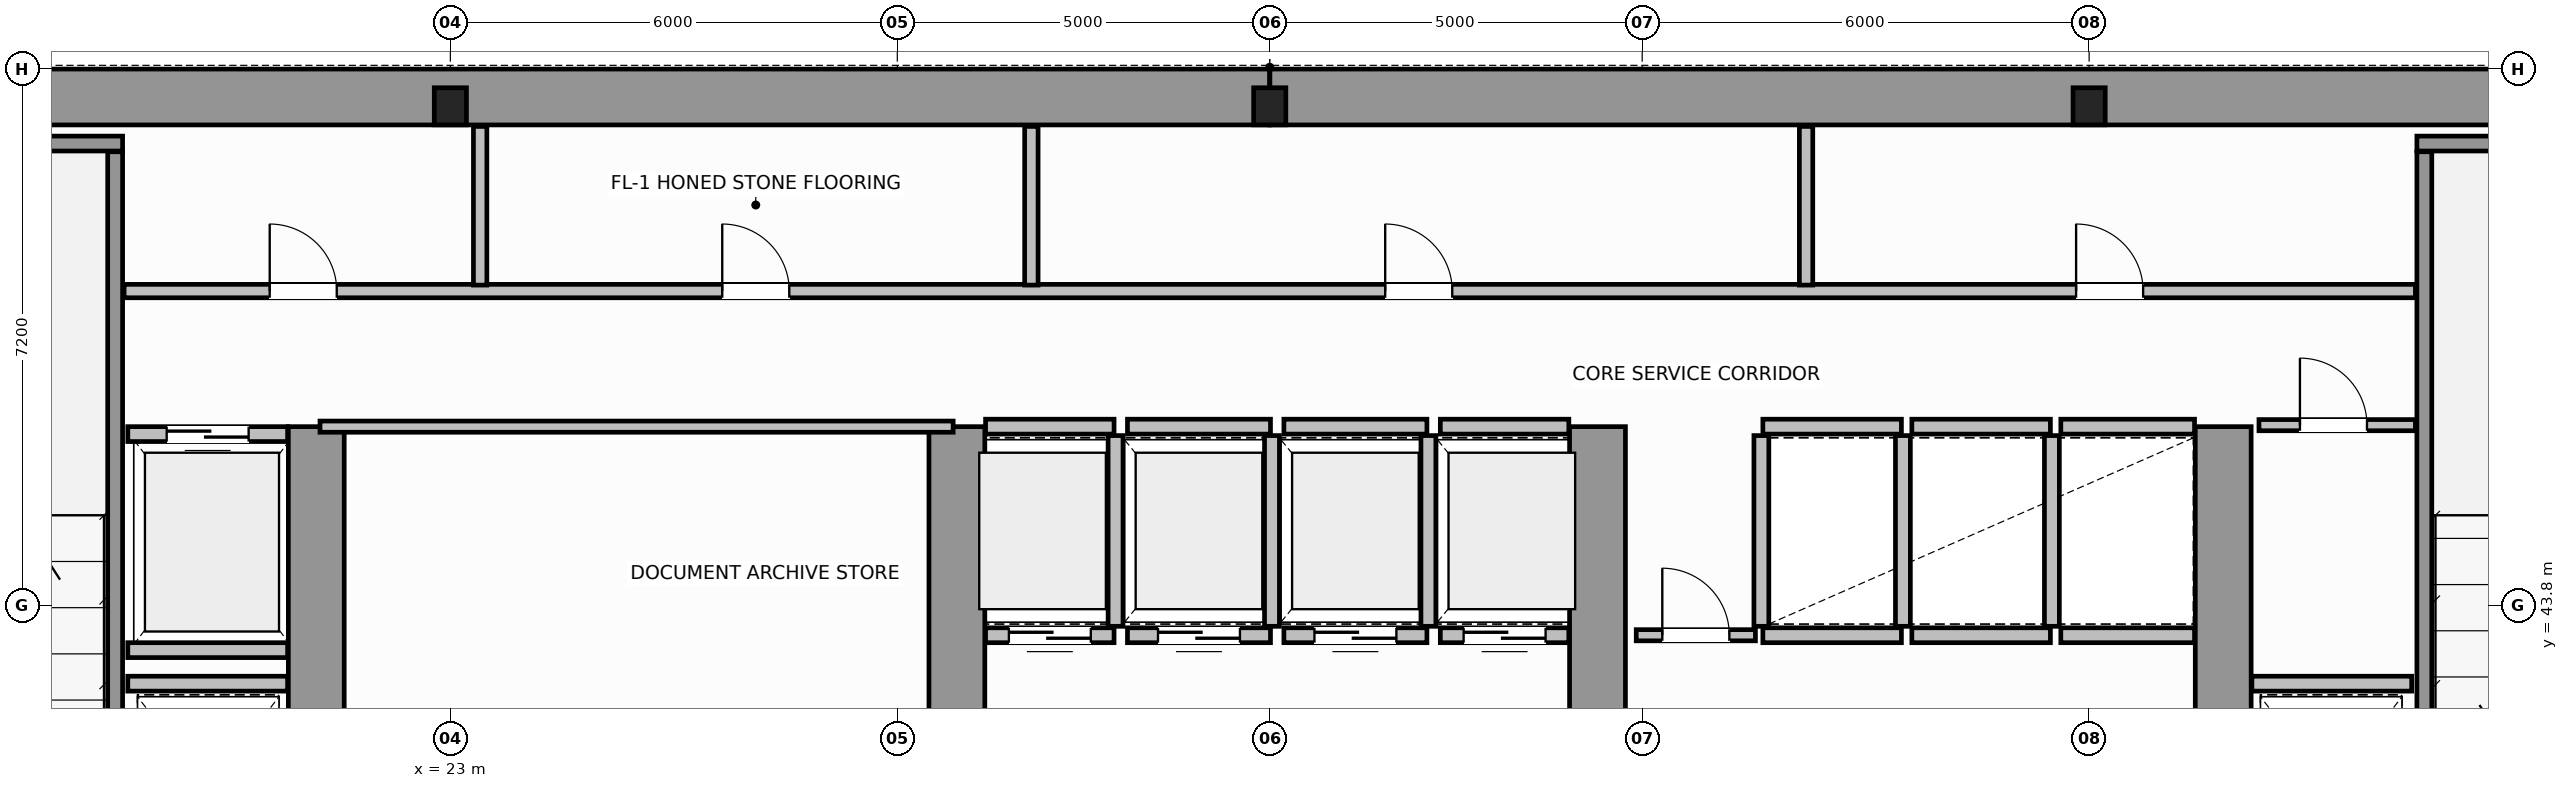
"""IFC4 building model, lengths in metres.
Left out: names, types, materials, properties, quantities, classifications, styles, units other than length and angle.
Written with IfcOpenShell. Run it as: python <this file> out.ifc"""

import sys

from ifc_helpers import new_model, si_unit, direction, frame, frame_2d, origin, origin_2d, place, context, subcontext, project, spatial, rectangle, i_section, extrude, source, transform, mapped, element, fill, save


model = new_model("IFC4")
c1 = context("Model", 3, precision=1e-05, world=origin(), true_north=direction((0.0, 1.0)))
c2 = subcontext(c1, "Body", "Model", "MODEL_VIEW")
j1 = project(units=[si_unit("LENGTHUNIT", "METRE"), si_unit("PLANEANGLEUNIT", "RADIAN")], contexts=[c1])
p1 = place(None, origin())
s1 = spatial("IfcSite", under=j1, at=p1, CompositionType="ELEMENT")
p2 = place(p1, origin())
s2 = spatial("IfcBuilding", under=s1, at=p2, CompositionType="ELEMENT")
p3 = place(p2, frame((0.0, 0.0, 145.2)))
s3 = spatial("IfcBuildingStorey", under=s2, at=p3, CompositionType="ELEMENT", Elevation=145.2)
m1 = source(origin(), c2, "Body", "SweptSolid", [
    extrude(i_section(OverallWidth=0.432, OverallDepth=0.498, WebThickness=0.055, FlangeThickness=0.068, FilletRadius=0.015, at=origin_2d()), origin(), (0.0, 0.0, 1.0), 3.8),
])
for number, where, z_axis, x_axis in (
    (1, (23.0, 50.5, 0.0), (0.0, 0.0, 1.0), (1.0, 0.0, 0.0)),
    (2, (34.0, 50.5, 0.0), (0.0, 0.0, 1.0), (1.0, 0.0, 0.0)),
    (3, (45.0, 50.5, 0.0), (0.0, 0.0, 1.0), (1.0, 0.0, 0.0)),
):
    element("IfcColumn", number, at=place(p3, frame(where, z_axis=z_axis, x_axis=x_axis)), inside=s3, PredefinedType="COLUMN", context=c2, shape_type="MappedRepresentation", body=[
        mapped(m1, transform((0.0, 0.0, 0.0), scale=1.0)),
    ])
for number, where, z_axis, x_axis in (
    (4, (14.379, 50.625, 0.0), (0.0, 0.0, 1.0), (1.0, 0.0, 0.0)),
    (5, (34.002, 50.625, 0.0), (0.0, 0.0, 1.0), (1.0, 0.0, 0.0)),
):
    element("IfcWall", number, at=place(p3, frame(where, z_axis=z_axis, x_axis=x_axis)), inside=s3, PredefinedType="SHEAR", context=c2, shape_type="SweptSolid", body=[
        extrude(rectangle(XDim=19.619, YDim=0.75, at=frame_2d((9.81, 0.0))), origin(), (0.0, 0.0, 1.0), 3.8),
    ])
for number, where, z_axis, x_axis in (
    (6, (21.2, 36.895, 0.0), (0.0, 0.0, 1.0), (0.0, 1.0, 0.0)),
    (7, (29.8, 36.895, 0.0), (0.0, 0.0, 1.0), (0.0, 1.0, 0.0)),
    (8, (38.4, 36.895, 0.0), (0.0, 0.0, 1.0), (0.0, 1.0, 0.0)),
    (9, (46.8, 36.895, 0.0), (0.0, 0.0, 1.0), (0.0, 1.0, 0.0)),
):
    element("IfcWall", number, at=place(p3, frame(where, z_axis=z_axis, x_axis=x_axis)), inside=s3, PredefinedType="SHEAR", context=c2, shape_type="SweptSolid", body=[
        extrude(rectangle(XDim=9.305, YDim=0.75, at=frame_2d((4.652, 0.0))), origin(), (0.0, 0.0, 1.0), 3.8),
    ])
p4 = place(p3, frame((14.375, 50.0, 0.0), z_axis=(0.0, 0.0, 1.0), x_axis=(1.0, 0.0, 0.0)))
e10 = element("IfcWall", 10, at=p4, inside=s3, PredefinedType="SOLIDWALL", context=c2, shape_type="SweptSolid", body=[
    extrude(rectangle(XDim=4.225, YDim=0.2, at=frame_2d((2.113, 0.0))), origin(), (0.0, 0.0, 1.0), 3.8),
])
p5 = place(p3, frame((18.5, 39.96, 0.0), z_axis=(0.0, 0.0, 1.0), x_axis=(0.0, 1.0, 0.0)))
e11 = element("IfcWall", 11, at=p5, inside=s3, PredefinedType="SOLIDWALL", context=c2, shape_type="SweptSolid", body=[
    extrude(rectangle(XDim=9.93, YDim=0.2, at=frame_2d((4.965, 0.0))), origin(), (0.0, 0.0, 1.0), 3.8),
])
p6 = place(p3, frame((49.4, 50.0, 0.0), z_axis=(0.0, 0.0, 1.0), x_axis=(1.0, 0.0, 0.0)))
e12 = element("IfcWall", 12, at=p6, inside=s3, PredefinedType="SOLIDWALL", context=c2, shape_type="SweptSolid", body=[
    extrude(rectangle(XDim=4.225, YDim=0.2, at=frame_2d((2.113, 0.0))), origin(), (0.0, 0.0, 1.0), 3.8),
])
p7 = place(p3, frame((49.5, 39.96, 0.0), z_axis=(0.0, 0.0, 1.0), x_axis=(0.0, 1.0, 0.0)))
e13 = element("IfcWall", 13, at=p7, inside=s3, PredefinedType="SOLIDWALL", context=c2, shape_type="SweptSolid", body=[
    extrude(rectangle(XDim=9.93, YDim=0.2, at=frame_2d((4.965, 0.0))), origin(), (0.0, 0.0, 1.0), 3.8),
])
p8 = place(p3, frame((30.185, 43.4, 0.0), z_axis=(0.0, 0.0, 1.0), x_axis=(1.0, 0.0, 0.0)))
e14 = element("IfcWall", 14, at=p8, inside=s3, PredefinedType="SOLIDWALL", context=c2, shape_type="SweptSolid", body=[
    extrude(rectangle(XDim=1.725, YDim=0.2, at=frame_2d((0.862, 0.0))), origin(), (0.0, 0.0, 1.0), 3.54),
])
p9 = place(p8, frame((0.313, 0.0, 0.0)))
e15 = element("IfcOpeningElement", 15, at=p9, cuts=e14, PredefinedType="OPENING", context=c2, shape_type="SweptSolid", body=[
    extrude(rectangle(XDim=1.1, YDim=2.15, at=frame_2d((0.55, 1.075))), frame((0.0, 0.11, 0.0), z_axis=(0.0, -1.0, 0.0), x_axis=(1.0, 0.0, 0.0)), (0.0, 0.0, 1.0), 0.22),
])
p10 = place(p3, frame((30.185, 46.2, 0.0), z_axis=(0.0, 0.0, 1.0), x_axis=(1.0, 0.0, 0.0)))
e16 = element("IfcWall", 16, at=p10, inside=s3, PredefinedType="SOLIDWALL", context=c2, shape_type="SweptSolid", body=[
    extrude(rectangle(XDim=1.725, YDim=0.2, at=frame_2d((0.862, 0.0))), origin(), (0.0, 0.0, 1.0), 3.54),
])
p11 = place(p3, frame((31.93, 43.52, 0.0), z_axis=(0.0, 0.0, 1.0), x_axis=(0.0, 1.0, 0.0)))
e17 = element("IfcWall", 17, at=p11, inside=s3, PredefinedType="SOLIDWALL", context=c2, shape_type="SweptSolid", body=[
    extrude(rectangle(XDim=2.56, YDim=0.2, at=frame_2d((1.28, 0.0))), origin(), (0.0, 0.0, 1.0), 3.54),
])
p12 = place(p3, frame((32.09, 43.4, 0.0), z_axis=(0.0, 0.0, 1.0), x_axis=(1.0, 0.0, 0.0)))
e18 = element("IfcWall", 18, at=p12, inside=s3, PredefinedType="SOLIDWALL", context=c2, shape_type="SweptSolid", body=[
    extrude(rectangle(XDim=1.92, YDim=0.2, at=frame_2d((0.96, 0.0))), origin(), (0.0, 0.0, 1.0), 3.54),
])
p13 = place(p12, frame((0.41, 0.0, 0.0)))
e19 = element("IfcOpeningElement", 19, at=p13, cuts=e18, PredefinedType="OPENING", context=c2, shape_type="SweptSolid", body=[
    extrude(rectangle(XDim=1.1, YDim=2.15, at=frame_2d((0.55, 1.075))), frame((0.0, 0.11, 0.0), z_axis=(0.0, -1.0, 0.0), x_axis=(1.0, 0.0, 0.0)), (0.0, 0.0, 1.0), 0.22),
])
p14 = place(p3, frame((32.09, 46.2, 0.0), z_axis=(0.0, 0.0, 1.0), x_axis=(1.0, 0.0, 0.0)))
e20 = element("IfcWall", 20, at=p14, inside=s3, PredefinedType="SOLIDWALL", context=c2, shape_type="SweptSolid", body=[
    extrude(rectangle(XDim=1.92, YDim=0.2, at=frame_2d((0.96, 0.0))), origin(), (0.0, 0.0, 1.0), 3.54),
])
p15 = place(p3, frame((34.03, 43.52, 0.0), z_axis=(0.0, 0.0, 1.0), x_axis=(0.0, 1.0, 0.0)))
e21 = element("IfcWall", 21, at=p15, inside=s3, PredefinedType="SOLIDWALL", context=c2, shape_type="SweptSolid", body=[
    extrude(rectangle(XDim=2.56, YDim=0.2, at=frame_2d((1.28, 0.0))), origin(), (0.0, 0.0, 1.0), 3.54),
])
p16 = place(p3, frame((34.19, 43.4, 0.0), z_axis=(0.0, 0.0, 1.0), x_axis=(1.0, 0.0, 0.0)))
e22 = element("IfcWall", 22, at=p16, inside=s3, PredefinedType="SOLIDWALL", context=c2, shape_type="SweptSolid", body=[
    extrude(rectangle(XDim=1.92, YDim=0.2, at=frame_2d((0.96, 0.0))), origin(), (0.0, 0.0, 1.0), 3.54),
])
p17 = place(p16, frame((0.41, 0.0, 0.0)))
e23 = element("IfcOpeningElement", 23, at=p17, cuts=e22, PredefinedType="OPENING", context=c2, shape_type="SweptSolid", body=[
    extrude(rectangle(XDim=1.1, YDim=2.15, at=frame_2d((0.55, 1.075))), frame((0.0, 0.11, 0.0), z_axis=(0.0, -1.0, 0.0), x_axis=(1.0, 0.0, 0.0)), (0.0, 0.0, 1.0), 0.22),
])
p18 = place(p3, frame((34.19, 46.2, 0.0), z_axis=(0.0, 0.0, 1.0), x_axis=(1.0, 0.0, 0.0)))
e24 = element("IfcWall", 24, at=p18, inside=s3, PredefinedType="SOLIDWALL", context=c2, shape_type="SweptSolid", body=[
    extrude(rectangle(XDim=1.92, YDim=0.2, at=frame_2d((0.96, 0.0))), origin(), (0.0, 0.0, 1.0), 3.54),
])
p19 = place(p3, frame((36.13, 43.52, 0.0), z_axis=(0.0, 0.0, 1.0), x_axis=(0.0, 1.0, 0.0)))
e25 = element("IfcWall", 25, at=p19, inside=s3, PredefinedType="SOLIDWALL", context=c2, shape_type="SweptSolid", body=[
    extrude(rectangle(XDim=2.56, YDim=0.2, at=frame_2d((1.28, 0.0))), origin(), (0.0, 0.0, 1.0), 3.54),
])
p20 = place(p3, frame((36.29, 43.4, 0.0), z_axis=(0.0, 0.0, 1.0), x_axis=(1.0, 0.0, 0.0)))
e26 = element("IfcWall", 26, at=p20, inside=s3, PredefinedType="SOLIDWALL", context=c2, shape_type="SweptSolid", body=[
    extrude(rectangle(XDim=1.725, YDim=0.2, at=frame_2d((0.862, 0.0))), origin(), (0.0, 0.0, 1.0), 3.54),
])
p21 = place(p20, frame((0.313, 0.0, 0.0)))
e27 = element("IfcOpeningElement", 27, at=p21, cuts=e26, PredefinedType="OPENING", context=c2, shape_type="SweptSolid", body=[
    extrude(rectangle(XDim=1.1, YDim=2.15, at=frame_2d((0.55, 1.075))), frame((0.0, 0.11, 0.0), z_axis=(0.0, -1.0, 0.0), x_axis=(1.0, 0.0, 0.0)), (0.0, 0.0, 1.0), 0.22),
])
p22 = place(p3, frame((36.29, 46.2, 0.0), z_axis=(0.0, 0.0, 1.0), x_axis=(1.0, 0.0, 0.0)))
e28 = element("IfcWall", 28, at=p22, inside=s3, PredefinedType="SOLIDWALL", context=c2, shape_type="SweptSolid", body=[
    extrude(rectangle(XDim=1.725, YDim=0.2, at=frame_2d((0.862, 0.0))), origin(), (0.0, 0.0, 1.0), 3.54),
])
for number, where, z_axis, x_axis in (
    (29, (40.62, 43.4, 0.0), (0.0, 0.0, 1.0), (1.0, 0.0, 0.0)),
    (30, (40.62, 46.2, 0.0), (0.0, 0.0, 1.0), (1.0, 0.0, 0.0)),
):
    element("IfcWall", number, at=place(p3, frame(where, z_axis=z_axis, x_axis=x_axis)), inside=s3, PredefinedType="SOLIDWALL", context=c2, shape_type="SweptSolid", body=[
        extrude(rectangle(XDim=1.86, YDim=0.2, at=frame_2d((0.93, 0.0))), origin(), (0.0, 0.0, 1.0), 3.54),
    ])
for number, where, z_axis, x_axis in (
    (31, (40.6, 43.52, 0.0), (0.0, 0.0, 1.0), (0.0, 1.0, 0.0)),
    (32, (42.5, 43.52, 0.0), (0.0, 0.0, 1.0), (0.0, 1.0, 0.0)),
):
    element("IfcWall", number, at=place(p3, frame(where, z_axis=z_axis, x_axis=x_axis)), inside=s3, PredefinedType="SOLIDWALL", context=c2, shape_type="SweptSolid", body=[
        extrude(rectangle(XDim=2.56, YDim=0.2, at=frame_2d((1.28, 0.0))), origin(), (0.0, 0.0, 1.0), 3.54),
    ])
for number, where, z_axis, x_axis in (
    (33, (42.62, 43.4, 0.0), (0.0, 0.0, 1.0), (1.0, 0.0, 0.0)),
    (34, (42.62, 46.2, 0.0), (0.0, 0.0, 1.0), (1.0, 0.0, 0.0)),
):
    element("IfcWall", number, at=place(p3, frame(where, z_axis=z_axis, x_axis=x_axis)), inside=s3, PredefinedType="SOLIDWALL", context=c2, shape_type="SweptSolid", body=[
        extrude(rectangle(XDim=1.86, YDim=0.2, at=frame_2d((0.93, 0.0))), origin(), (0.0, 0.0, 1.0), 3.54),
    ])
p23 = place(p3, frame((44.5, 43.52, 0.0), z_axis=(0.0, 0.0, 1.0), x_axis=(0.0, 1.0, 0.0)))
e35 = element("IfcWall", 35, at=p23, inside=s3, PredefinedType="SOLIDWALL", context=c2, shape_type="SweptSolid", body=[
    extrude(rectangle(XDim=2.56, YDim=0.2, at=frame_2d((1.28, 0.0))), origin(), (0.0, 0.0, 1.0), 3.54),
])
for number, where, z_axis, x_axis in (
    (36, (44.62, 43.4, 0.0), (0.0, 0.0, 1.0), (1.0, 0.0, 0.0)),
    (37, (44.62, 46.2, 0.0), (0.0, 0.0, 1.0), (1.0, 0.0, 0.0)),
):
    element("IfcWall", number, at=place(p3, frame(where, z_axis=z_axis, x_axis=x_axis)), inside=s3, PredefinedType="SOLIDWALL", context=c2, shape_type="SweptSolid", body=[
        extrude(rectangle(XDim=1.795, YDim=0.2, at=frame_2d((0.897, 0.0))), origin(), (0.0, 0.0, 1.0), 3.54),
    ])
p24 = place(p3, frame((18.67, 46.1, 0.0), z_axis=(0.0, 0.0, 1.0), x_axis=(1.0, 0.0, 0.0)))
e38 = element("IfcWall", 38, at=p24, inside=s3, PredefinedType="SOLIDWALL", context=c2, shape_type="SweptSolid", body=[
    extrude(rectangle(XDim=2.145, YDim=0.2, at=frame_2d((1.073, 0.0))), origin(), (0.0, 0.0, 1.0), 3.54),
])
p25 = place(p24, frame((0.522, 0.0, 0.0)))
e39 = element("IfcOpeningElement", 39, at=p25, cuts=e38, PredefinedType="OPENING", context=c2, shape_type="SweptSolid", body=[
    extrude(rectangle(XDim=1.1, YDim=2.15, at=frame_2d((0.55, 1.075))), frame((0.0, 0.11, 0.0), z_axis=(0.0, -1.0, 0.0), x_axis=(1.0, 0.0, 0.0)), (0.0, 0.0, 1.0), 0.22),
])
for number, where, z_axis, x_axis in (
    (40, (18.67, 43.2, 0.0), (0.0, 0.0, 1.0), (1.0, 0.0, 0.0)),
    (41, (18.67, 42.75, 0.0), (0.0, 0.0, 1.0), (1.0, 0.0, 0.0)),
    (42, (47.185, 42.75, 0.0), (0.0, 0.0, 1.0), (1.0, 0.0, 0.0)),
):
    element("IfcWall", number, at=place(p3, frame(where, z_axis=z_axis, x_axis=x_axis)), inside=s3, PredefinedType="SOLIDWALL", context=c2, shape_type="SweptSolid", body=[
        extrude(rectangle(XDim=2.145, YDim=0.2, at=frame_2d((1.073, 0.0))), origin(), (0.0, 0.0, 1.0), 3.54),
    ])
p26 = place(p3, frame((21.25, 46.2, 0.0), z_axis=(0.0, 0.0, 1.0), x_axis=(1.0, 0.0, 0.0)))
e43 = element("IfcWall", 43, at=p26, inside=s3, PredefinedType="PARTITIONING", context=c2, shape_type="SweptSolid", body=[
    extrude(rectangle(XDim=8.5, YDim=0.15, at=frame_2d((4.25, 0.0))), origin(), (0.0, 0.0, 1.0), 3.54),
])
p27 = place(p3, frame((47.28, 46.22, 0.0), z_axis=(0.0, 0.0, 1.0), x_axis=(1.0, 0.0, 0.0)))
e44 = element("IfcWall", 44, at=p27, inside=s3, PredefinedType="PARTITIONING", context=c2, shape_type="SweptSolid", body=[
    extrude(rectangle(XDim=2.1, YDim=0.15, at=frame_2d((1.05, 0.0))), origin(), (0.0, 0.0, 1.0), 3.54),
])
p28 = place(p27, frame((0.55, 0.0, 0.0)))
e45 = element("IfcOpeningElement", 45, at=p28, cuts=e44, PredefinedType="OPENING", context=c2, shape_type="SweptSolid", body=[
    extrude(rectangle(XDim=0.9, YDim=2.1, at=frame_2d((0.45, 1.05))), frame((0.0, 0.085, 0.0), z_axis=(0.0, -1.0, 0.0), x_axis=(1.0, 0.0, 0.0)), (0.0, 0.0, 1.0), 0.17),
])
p29 = place(p3, frame((38.92, 43.4, 0.0), z_axis=(0.0, 0.0, 1.0), x_axis=(1.0, 0.0, 0.0)))
e46 = element("IfcWall", 46, at=p29, inside=s3, PredefinedType="PARTITIONING", context=c2, shape_type="SweptSolid", body=[
    extrude(rectangle(XDim=1.6, YDim=0.15, at=frame_2d((0.8, 0.0))), origin(), (0.0, 0.0, 1.0), 3.54),
])
p30 = place(p29, frame((0.35, 0.0, 0.0)))
e47 = element("IfcOpeningElement", 47, at=p30, cuts=e46, PredefinedType="OPENING", context=c2, shape_type="SweptSolid", body=[
    extrude(rectangle(XDim=0.9, YDim=2.1, at=frame_2d((0.45, 1.05))), frame((0.0, 0.085, 0.0), z_axis=(0.0, -1.0, 0.0), x_axis=(1.0, 0.0, 0.0)), (0.0, 0.0, 1.0), 0.17),
])
p31 = place(p3, frame((18.62, 48.02, 0.0), z_axis=(0.0, 0.0, 1.0), x_axis=(1.0, 0.0, 0.0)))
e48 = element("IfcWall", 48, at=p31, inside=s3, PredefinedType="PLUMBINGWALL", context=c2, shape_type="SweptSolid", body=[
    extrude(rectangle(XDim=30.76, YDim=0.18, at=frame_2d((15.38, 0.0))), origin(), (0.0, 0.0, 1.0), 3.54),
])
p32 = place(p31, frame((1.955, 0.0, 0.0)))
e49 = element("IfcOpeningElement", 49, at=p32, cuts=e48, PredefinedType="OPENING", context=c2, shape_type="SweptSolid", body=[
    extrude(rectangle(XDim=0.9, YDim=2.15, at=frame_2d((0.45, 1.075))), frame((0.0, 0.1, 0.0), z_axis=(0.0, -1.0, 0.0), x_axis=(1.0, 0.0, 0.0)), (0.0, 0.0, 1.0), 0.2),
])
p33 = place(p31, frame((8.03, 0.0, 0.0)))
e50 = element("IfcOpeningElement", 50, at=p33, cuts=e48, PredefinedType="OPENING", context=c2, shape_type="SweptSolid", body=[
    extrude(rectangle(XDim=0.9, YDim=2.15, at=frame_2d((0.45, 1.075))), frame((0.0, 0.1, 0.0), z_axis=(0.0, -1.0, 0.0), x_axis=(1.0, 0.0, 0.0)), (0.0, 0.0, 1.0), 0.2),
])
p34 = place(p31, frame((16.93, 0.0, 0.0)))
e51 = element("IfcOpeningElement", 51, at=p34, cuts=e48, PredefinedType="OPENING", context=c2, shape_type="SweptSolid", body=[
    extrude(rectangle(XDim=0.9, YDim=2.15, at=frame_2d((0.45, 1.075))), frame((0.0, 0.1, 0.0), z_axis=(0.0, -1.0, 0.0), x_axis=(1.0, 0.0, 0.0)), (0.0, 0.0, 1.0), 0.2),
])
p35 = place(p31, frame((26.205, 0.0, 0.0)))
e52 = element("IfcOpeningElement", 52, at=p35, cuts=e48, PredefinedType="OPENING", context=c2, shape_type="SweptSolid", body=[
    extrude(rectangle(XDim=0.9, YDim=2.15, at=frame_2d((0.45, 1.075))), frame((0.0, 0.1, 0.0), z_axis=(0.0, -1.0, 0.0), x_axis=(1.0, 0.0, 0.0)), (0.0, 0.0, 1.0), 0.2),
])
for number, where, z_axis, x_axis in (
    (53, (23.4, 48.1, 0.0), (0.0, 0.0, 1.0), (0.0, 1.0, 0.0)),
    (54, (30.8, 48.1, 0.0), (0.0, 0.0, 1.0), (0.0, 1.0, 0.0)),
    (55, (41.2, 48.1, 0.0), (0.0, 0.0, 1.0), (0.0, 1.0, 0.0)),
):
    element("IfcWall", number, at=place(p3, frame(where, z_axis=z_axis, x_axis=x_axis)), inside=s3, PredefinedType="PLUMBINGWALL", context=c2, shape_type="SweptSolid", body=[
        extrude(rectangle(XDim=2.13, YDim=0.18, at=frame_2d((1.065, 0.0))), origin(), (0.0, 0.0, 1.0), 3.54),
    ])
m2 = source(origin(), c2, "Body", "SweptSolid", [
    extrude(rectangle(XDim=1.1, YDim=2.15, at=frame_2d((0.55, 1.075))), frame((0.0, 0.025, 0.0), z_axis=(0.0, -1.0, 0.0), x_axis=(1.0, 0.0, 0.0)), (0.0, 0.0, 1.0), 0.05),
])
p36 = place(p9, origin())
e56 = element("IfcDoor", 56, at=p36, inside=s3, OperationType="DOUBLE_DOOR_SLIDING", PredefinedType="DOOR", context=c2, shape_type="MappedRepresentation", body=[
    mapped(m2, transform((0.0, 0.0, 0.0), scale=1.0)),
])
fill(e15, e56)
p37 = place(p13, origin())
e57 = element("IfcDoor", 57, at=p37, inside=s3, OperationType="DOUBLE_DOOR_SLIDING", PredefinedType="DOOR", context=c2, shape_type="MappedRepresentation", body=[
    mapped(m2, transform((0.0, 0.0, 0.0), scale=1.0)),
])
fill(e19, e57)
p38 = place(p17, origin())
e58 = element("IfcDoor", 58, at=p38, inside=s3, OperationType="DOUBLE_DOOR_SLIDING", PredefinedType="DOOR", context=c2, shape_type="MappedRepresentation", body=[
    mapped(m2, transform((0.0, 0.0, 0.0), scale=1.0)),
])
fill(e23, e58)
p39 = place(p21, origin())
e59 = element("IfcDoor", 59, at=p39, inside=s3, OperationType="DOUBLE_DOOR_SLIDING", PredefinedType="DOOR", context=c2, shape_type="MappedRepresentation", body=[
    mapped(m2, transform((0.0, 0.0, 0.0), scale=1.0)),
])
fill(e27, e59)
p40 = place(p25, origin())
e60 = element("IfcDoor", 60, at=p40, inside=s3, OperationType="DOUBLE_DOOR_SLIDING", PredefinedType="DOOR", context=c2, shape_type="MappedRepresentation", body=[
    mapped(m2, transform((0.0, 0.0, 0.0), scale=1.0)),
])
fill(e39, e60)
m3 = source(origin(), c2, "Body", "SweptSolid", [
    extrude(rectangle(XDim=0.9, YDim=2.1, at=frame_2d((0.45, 1.05))), frame((0.0, 0.025, 0.0), z_axis=(0.0, -1.0, 0.0), x_axis=(1.0, 0.0, 0.0)), (0.0, 0.0, 1.0), 0.05),
])
p41 = place(p28, origin())
e61 = element("IfcDoor", 61, at=p41, inside=s3, OperationType="SINGLE_SWING_RIGHT", PredefinedType="DOOR", context=c2, shape_type="MappedRepresentation", body=[
    mapped(m3, transform((0.0, 0.0, 0.0), scale=1.0)),
])
fill(e45, e61)
p42 = place(p30, origin())
e62 = element("IfcDoor", 62, at=p42, inside=s3, OperationType="SINGLE_SWING_LEFT", PredefinedType="DOOR", context=c2, shape_type="MappedRepresentation", body=[
    mapped(m3, transform((0.0, 0.0, 0.0), scale=1.0)),
])
fill(e47, e62)
m4 = source(origin(), c2, "Body", "SweptSolid", [
    extrude(rectangle(XDim=0.9, YDim=2.15, at=frame_2d((0.45, 1.075))), frame((0.0, 0.025, 0.0), z_axis=(0.0, -1.0, 0.0), x_axis=(1.0, 0.0, 0.0)), (0.0, 0.0, 1.0), 0.05),
])
p43 = place(p32, origin())
e63 = element("IfcDoor", 63, at=p43, inside=s3, OperationType="SINGLE_SWING_LEFT", PredefinedType="DOOR", context=c2, shape_type="MappedRepresentation", body=[
    mapped(m4, transform((0.0, 0.0, 0.0), scale=1.0)),
])
fill(e49, e63)
p44 = place(p33, origin())
e64 = element("IfcDoor", 64, at=p44, inside=s3, OperationType="SINGLE_SWING_RIGHT", PredefinedType="DOOR", context=c2, shape_type="MappedRepresentation", body=[
    mapped(m4, transform((0.0, 0.0, 0.0), scale=1.0)),
])
fill(e50, e64)
p45 = place(p34, origin())
e65 = element("IfcDoor", 65, at=p45, inside=s3, OperationType="SINGLE_SWING_LEFT", PredefinedType="DOOR", context=c2, shape_type="MappedRepresentation", body=[
    mapped(m4, transform((0.0, 0.0, 0.0), scale=1.0)),
])
fill(e51, e65)
p46 = place(p35, origin())
e66 = element("IfcDoor", 66, at=p46, inside=s3, OperationType="SINGLE_SWING_RIGHT", PredefinedType="DOOR", context=c2, shape_type="MappedRepresentation", body=[
    mapped(m4, transform((0.0, 0.0, 0.0), scale=1.0)),
])
fill(e52, e66)
save(model, sys.argv[1])
